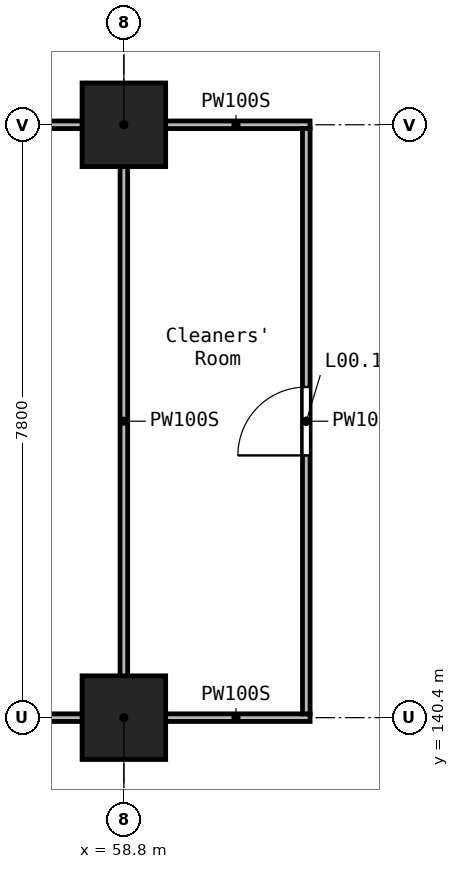
"""IFC4 building model, lengths in metres.
Left out: names, types, materials, properties, quantities, classifications, styles, units other than length and angle.
Written with IfcOpenShell. Run it as: python <this file> out.ifc"""

import sys

from ifc_helpers import new_model, si_unit, direction, frame, frame_2d, origin, origin_2d, place, context, subcontext, project, spatial, rectangle, extrude, element, fill, save


model = new_model("IFC4")
c1 = context("Model", 3, precision=1e-05, world=origin(), true_north=direction((0.0, 1.0)))
c2 = subcontext(c1, "Body", "Model", "MODEL_VIEW")
j1 = project(units=[si_unit("LENGTHUNIT", "METRE"), si_unit("PLANEANGLEUNIT", "RADIAN")], contexts=[c1])
p1 = place(None, origin())
s1 = spatial("IfcSite", under=j1, at=p1, CompositionType="ELEMENT")
p2 = place(p1, origin())
s2 = spatial("IfcBuilding", under=s1, at=p2, CompositionType="ELEMENT")
p3 = place(p2, origin())
s3 = spatial("IfcBuildingStorey", under=s2, at=p3, CompositionType="ELEMENT", Elevation=0.0)
for number, where, z_axis, x_axis in (
    (1, (58.8, 140.4, -0.3), (0.0, 0.0, 1.0), (1.0, 0.0, 0.0)),
    (2, (58.8, 148.2, -0.3), (0.0, 0.0, 1.0), (1.0, 0.0, 0.0)),
):
    element("IfcColumn", number, at=place(p3, frame(where, z_axis=z_axis, x_axis=x_axis)), inside=s3, PredefinedType="COLUMN", context=c2, shape_type="SweptSolid", body=[
        extrude(rectangle(XDim=1.1, YDim=1.1, at=origin_2d()), origin(), (0.0, 0.0, 1.0), 5.7),
    ])
p4 = place(p3, frame((61.25, 140.4, 0.0), z_axis=(0.0, 0.0, 1.0), x_axis=(-1.0, 0.0, 0.0)))
e3 = element("IfcWall", 3, at=p4, inside=s3, PredefinedType="PARTITIONING", context=c2, shape_type="SweptSolid", body=[
    extrude(rectangle(XDim=1.95, YDim=0.1, at=frame_2d((0.975, 0.0))), origin(), (0.0, 0.0, 1.0), 5.05),
])
p5 = place(p3, frame((58.3, 140.4, 0.0), z_axis=(0.0, 0.0, 1.0), x_axis=(-1.0, 0.0, 0.0)))
e4 = element("IfcWall", 4, at=p5, inside=s3, PredefinedType="PARTITIONING", context=c2, shape_type="SweptSolid", body=[
    extrude(rectangle(XDim=7.4, YDim=0.1, at=frame_2d((3.7, 0.0))), origin(), (0.0, 0.0, 1.0), 5.05),
])
p6 = place(p5, frame((2.05, 0.0, 0.0)))
e5 = element("IfcOpeningElement", 5, at=p6, cuts=e4, PredefinedType="OPENING", context=c2, shape_type="SweptSolid", body=[
    extrude(rectangle(XDim=0.9, YDim=2.1, at=frame_2d((0.45, 1.05))), frame((0.0, 0.06, 0.0), z_axis=(0.0, -1.0, 0.0), x_axis=(1.0, 0.0, 0.0)), (0.0, 0.0, 1.0), 0.12),
])
p7 = place(p3, frame((61.25, 148.2, 0.0), z_axis=(0.0, 0.0, 1.0), x_axis=(-1.0, 0.0, 0.0)))
e6 = element("IfcWall", 6, at=p7, inside=s3, PredefinedType="PARTITIONING", context=c2, shape_type="SweptSolid", body=[
    extrude(rectangle(XDim=1.95, YDim=0.1, at=frame_2d((0.975, 0.0))), origin(), (0.0, 0.0, 1.0), 5.05),
])
p8 = place(p3, frame((58.3, 148.2, 0.0), z_axis=(0.0, 0.0, 1.0), x_axis=(-1.0, 0.0, 0.0)))
e7 = element("IfcWall", 7, at=p8, inside=s3, PredefinedType="PARTITIONING", context=c2, shape_type="SweptSolid", body=[
    extrude(rectangle(XDim=7.4, YDim=0.1, at=frame_2d((3.7, 0.0))), origin(), (0.0, 0.0, 1.0), 5.05),
])
p9 = place(p3, frame((58.8, 140.9, 0.0), z_axis=(0.0, 0.0, 1.0), x_axis=(0.0, 1.0, 0.0)))
e8 = element("IfcWall", 8, at=p9, inside=s3, PredefinedType="PARTITIONING", context=c2, shape_type="SweptSolid", body=[
    extrude(rectangle(XDim=6.8, YDim=0.1, at=frame_2d((3.4, 0.0))), origin(), (0.0, 0.0, 1.0), 5.05),
])
p10 = place(p3, frame((61.2, 140.45, 0.0), z_axis=(0.0, 0.0, 1.0), x_axis=(0.0, 1.0, 0.0)))
e9 = element("IfcWall", 9, at=p10, inside=s3, PredefinedType="PARTITIONING", context=c2, shape_type="SweptSolid", body=[
    extrude(rectangle(XDim=7.7, YDim=0.1, at=frame_2d((3.85, 0.0))), origin(), (0.0, 0.0, 1.0), 5.05),
])
p11 = place(p10, frame((3.4, 0.0, 0.0)))
e10 = element("IfcOpeningElement", 10, at=p11, cuts=e9, PredefinedType="OPENING", context=c2, shape_type="SweptSolid", body=[
    extrude(rectangle(XDim=0.9, YDim=2.1, at=frame_2d((0.45, 1.05))), frame((0.0, 0.06, 0.0), z_axis=(0.0, -1.0, 0.0), x_axis=(1.0, 0.0, 0.0)), (0.0, 0.0, 1.0), 0.12),
])
p12 = place(p11, origin())
e11 = element("IfcDoor", 11, at=p12, inside=s3, OperationType="SINGLE_SWING_LEFT", PredefinedType="DOOR", context=c2, shape_type="SweptSolid", body=[
    extrude(rectangle(XDim=0.9, YDim=2.1, at=frame_2d((0.45, 1.05))), frame((0.0, 0.025, 0.0), z_axis=(0.0, -1.0, 0.0), x_axis=(1.0, 0.0, 0.0)), (0.0, 0.0, 1.0), 0.05),
])
fill(e10, e11)
save(model, sys.argv[1])
